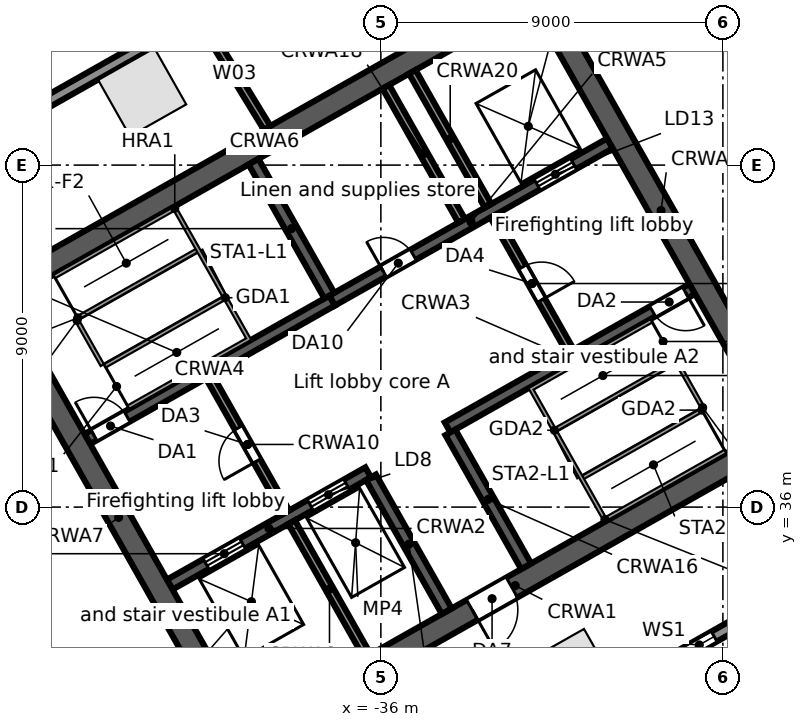
"""IFC4 building model, lengths in metres.
Left out: names, types, materials, properties, quantities, classifications, styles, units other than length and angle.
Written with IfcOpenShell. Run it as: python <this file> out.ifc"""

import sys

from ifc_helpers import new_model, si_unit, direction, frame, frame_2d, origin, origin_2d, place, context, subcontext, project, spatial, rectangle, extrude, element, fill, save


model = new_model("IFC4")
c1 = context("Model", 3, precision=1e-05, world=origin(), true_north=direction((0.0, 1.0)))
c2 = subcontext(c1, "Body", "Model", "MODEL_VIEW")
j1 = project(units=[si_unit("LENGTHUNIT", "METRE"), si_unit("PLANEANGLEUNIT", "RADIAN")], contexts=[c1])
p1 = place(None, origin())
s1 = spatial("IfcSite", under=j1, at=p1, CompositionType="ELEMENT")
p2 = place(p1, origin())
s2 = spatial("IfcBuilding", under=s1, at=p2, CompositionType="ELEMENT")
p3 = place(p2, frame((0.0, 0.0, 81.5)))
s3 = spatial("IfcBuildingStorey", under=s2, at=p3, CompositionType="ELEMENT", Elevation=81.5)
for number, where, z_axis, x_axis in (
    (1, (-42.28, 46.919, 0.0), (0.0, 0.0, 1.0), (-0.87, -0.492, 0.0)),
    (2, (-30.976, 31.635, 0.0), (0.0, 0.0, 1.0), (0.87, 0.492, 0.0)),
):
    element("IfcColumn", number, at=place(p3, frame(where, z_axis=z_axis, x_axis=x_axis)), inside=s3, PredefinedType="COLUMN", context=c2, shape_type="SweptSolid", body=[
        extrude(rectangle(XDim=1.7, YDim=1.7, at=origin_2d()), origin(), (0.0, 0.0, 1.0), 5.0),
    ])
p4 = place(p3, frame((-58.745, 38.764, 0.0), z_axis=(0.0, 0.0, 1.0), x_axis=(0.870355811726, 0.492423355453, 0.0)))
e3 = element("IfcWall", 3, at=p4, inside=s3, PredefinedType="STANDARD", context=c2, shape_type="SweptSolid", body=[
    extrude(rectangle(XDim=64.025, YDim=0.3, at=frame_2d((32.013, 0.0))), origin(), (0.0, 0.0, 1.0), 4.68),
])
p5 = place(p4, frame((60.122, 0.0, 0.6)))
e4 = element("IfcOpeningElement", 4, at=p5, cuts=e3, PredefinedType="OPENING", context=c2, shape_type="SweptSolid", body=[
    extrude(rectangle(XDim=0.9, YDim=3.2, at=frame_2d((0.45, 1.6))), frame((0.0, 0.16, 0.0), z_axis=(0.0, -1.0, 0.0), x_axis=(1.0, 0.0, 0.0)), (0.0, 0.0, 1.0), 0.32),
])
p6 = place(p4, frame((50.992, 0.0, 0.6)))
e5 = element("IfcOpeningElement", 5, at=p6, cuts=e3, PredefinedType="OPENING", context=c2, shape_type="SweptSolid", body=[
    extrude(rectangle(XDim=0.9, YDim=3.2, at=frame_2d((0.45, 1.6))), frame((0.0, 0.16, 0.0), z_axis=(0.0, -1.0, 0.0), x_axis=(1.0, 0.0, 0.0)), (0.0, 0.0, 1.0), 0.32),
])
p7 = place(p4, frame((41.862, 0.0, 0.6)))
e6 = element("IfcOpeningElement", 6, at=p7, cuts=e3, PredefinedType="OPENING", context=c2, shape_type="SweptSolid", body=[
    extrude(rectangle(XDim=0.9, YDim=3.2, at=frame_2d((0.45, 1.6))), frame((0.0, 0.16, 0.0), z_axis=(0.0, -1.0, 0.0), x_axis=(1.0, 0.0, 0.0)), (0.0, 0.0, 1.0), 0.32),
])
p8 = place(p4, frame((32.732, 0.0, 0.6)))
e7 = element("IfcOpeningElement", 7, at=p8, cuts=e3, PredefinedType="OPENING", context=c2, shape_type="SweptSolid", body=[
    extrude(rectangle(XDim=0.9, YDim=3.2, at=frame_2d((0.45, 1.6))), frame((0.0, 0.16, 0.0), z_axis=(0.0, -1.0, 0.0), x_axis=(1.0, 0.0, 0.0)), (0.0, 0.0, 1.0), 0.32),
])
p9 = place(p4, frame((23.602, 0.0, 0.6)))
e8 = element("IfcOpeningElement", 8, at=p9, cuts=e3, PredefinedType="OPENING", context=c2, shape_type="SweptSolid", body=[
    extrude(rectangle(XDim=0.9, YDim=3.2, at=frame_2d((0.45, 1.6))), frame((0.0, 0.16, 0.0), z_axis=(0.0, -1.0, 0.0), x_axis=(1.0, 0.0, 0.0)), (0.0, 0.0, 1.0), 0.32),
])
p10 = place(p4, frame((14.472, 0.0, 0.6)))
e9 = element("IfcOpeningElement", 9, at=p10, cuts=e3, PredefinedType="OPENING", context=c2, shape_type="SweptSolid", body=[
    extrude(rectangle(XDim=0.9, YDim=3.2, at=frame_2d((0.45, 1.6))), frame((0.0, 0.16, 0.0), z_axis=(0.0, -1.0, 0.0), x_axis=(1.0, 0.0, 0.0)), (0.0, 0.0, 1.0), 0.32),
])
p11 = place(p4, frame((5.342, 0.0, 0.6)))
e10 = element("IfcOpeningElement", 10, at=p11, cuts=e3, PredefinedType="OPENING", context=c2, shape_type="SweptSolid", body=[
    extrude(rectangle(XDim=0.9, YDim=3.2, at=frame_2d((0.45, 1.6))), frame((0.0, 0.16, 0.0), z_axis=(0.0, -1.0, 0.0), x_axis=(1.0, 0.0, 0.0)), (0.0, 0.0, 1.0), 0.32),
])
p12 = place(p3, frame((-44.109, 26.504, 0.0), z_axis=(0.0, 0.0, 1.0), x_axis=(-0.857169502585, 0.515034410344, 0.0)))
e11 = element("IfcWall", 11, at=p12, inside=s3, PredefinedType="STANDARD", context=c2, shape_type="SweptSolid", body=[
    extrude(rectangle(XDim=17.127, YDim=0.3, at=frame_2d((8.563, 0.0))), origin(), (0.0, 0.0, 1.0), 4.68),
])
p13 = place(p12, frame((13.403, 0.0, 0.6)))
e12 = element("IfcOpeningElement", 12, at=p13, cuts=e11, PredefinedType="OPENING", context=c2, shape_type="SweptSolid", body=[
    extrude(rectangle(XDim=0.9, YDim=3.2, at=frame_2d((0.45, 1.6))), frame((0.0, 0.16, 0.0), z_axis=(0.0, -1.0, 0.0), x_axis=(1.0, 0.0, 0.0)), (0.0, 0.0, 1.0), 0.32),
])
p14 = place(p12, frame((4.903, 0.0, 0.6)))
e13 = element("IfcOpeningElement", 13, at=p14, cuts=e11, PredefinedType="OPENING", context=c2, shape_type="SweptSolid", body=[
    extrude(rectangle(XDim=0.9, YDim=3.2, at=frame_2d((0.45, 1.6))), frame((0.0, 0.16, 0.0), z_axis=(0.0, -1.0, 0.0), x_axis=(1.0, 0.0, 0.0)), (0.0, 0.0, 1.0), 0.32),
])
p15 = place(p3, frame((-0.055, 47.969, 0.0), z_axis=(0.0, 0.0, 1.0), x_axis=(-0.870355730478, -0.492423499058, 0.0)))
e14 = element("IfcWall", 14, at=p15, inside=s3, PredefinedType="STANDARD", context=c2, shape_type="SweptSolid", body=[
    extrude(rectangle(XDim=43.75, YDim=0.3, at=frame_2d((21.875, 0.0))), origin(), (0.0, 0.0, 1.0), 4.68),
])
p16 = place(p15, frame((39.977, 0.0, 0.6)))
e15 = element("IfcOpeningElement", 15, at=p16, cuts=e14, PredefinedType="OPENING", context=c2, shape_type="SweptSolid", body=[
    extrude(rectangle(XDim=0.9, YDim=3.2, at=frame_2d((0.45, 1.6))), frame((0.0, 0.16, 0.0), z_axis=(0.0, -1.0, 0.0), x_axis=(1.0, 0.0, 0.0)), (0.0, 0.0, 1.0), 0.32),
])
p17 = place(p15, frame((31.222, 0.0, 0.6)))
e16 = element("IfcOpeningElement", 16, at=p17, cuts=e14, PredefinedType="OPENING", context=c2, shape_type="SweptSolid", body=[
    extrude(rectangle(XDim=0.9, YDim=3.2, at=frame_2d((0.45, 1.6))), frame((0.0, 0.16, 0.0), z_axis=(0.0, -1.0, 0.0), x_axis=(1.0, 0.0, 0.0)), (0.0, 0.0, 1.0), 0.32),
])
p18 = place(p15, frame((22.468, 0.0, 0.6)))
e17 = element("IfcOpeningElement", 17, at=p18, cuts=e14, PredefinedType="OPENING", context=c2, shape_type="SweptSolid", body=[
    extrude(rectangle(XDim=0.9, YDim=3.2, at=frame_2d((0.45, 1.6))), frame((0.0, 0.16, 0.0), z_axis=(0.0, -1.0, 0.0), x_axis=(1.0, 0.0, 0.0)), (0.0, 0.0, 1.0), 0.32),
])
p19 = place(p15, frame((13.713, 0.0, 0.6)))
e18 = element("IfcOpeningElement", 18, at=p19, cuts=e14, PredefinedType="OPENING", context=c2, shape_type="SweptSolid", body=[
    extrude(rectangle(XDim=0.9, YDim=3.2, at=frame_2d((0.45, 1.6))), frame((0.0, 0.16, 0.0), z_axis=(0.0, -1.0, 0.0), x_axis=(1.0, 0.0, 0.0)), (0.0, 0.0, 1.0), 0.32),
])
p20 = place(p15, frame((4.959, 0.0, 0.6)))
e19 = element("IfcOpeningElement", 19, at=p20, cuts=e14, PredefinedType="OPENING", context=c2, shape_type="SweptSolid", body=[
    extrude(rectangle(XDim=0.9, YDim=3.2, at=frame_2d((0.45, 1.6))), frame((0.0, 0.16, 0.0), z_axis=(0.0, -1.0, 0.0), x_axis=(1.0, 0.0, 0.0)), (0.0, 0.0, 1.0), 0.32),
])
p21 = place(p3, frame((-39.862, 29.749, 0.0), z_axis=(0.0, 0.0, 1.0), x_axis=(0.870350116061, 0.492433422375, 0.0)))
e20 = element("IfcWall", 20, at=p21, inside=s3, PredefinedType="SOLIDWALL", context=c2, shape_type="SweptSolid", body=[
    extrude(rectangle(XDim=17.0, YDim=0.6, at=frame_2d((8.5, 0.0))), origin(), (0.0, 0.0, 1.0), 4.68),
])
p22 = place(p21, frame((7.2, 0.0, 0.0)))
e21 = element("IfcOpeningElement", 21, at=p22, cuts=e20, PredefinedType="OPENING", context=c2, shape_type="SweptSolid", body=[
    extrude(rectangle(XDim=1.2, YDim=2.1, at=frame_2d((0.6, 1.05))), frame((0.0, 0.31, 0.0), z_axis=(0.0, -1.0, 0.0), x_axis=(1.0, 0.0, 0.0)), (0.0, 0.0, 1.0), 0.62),
])
p23 = place(p3, frame((-41.556, 33.961, 0.0), z_axis=(0.0, 0.0, 1.0), x_axis=(0.870343731308, 0.492444706919, 0.0)))
e22 = element("IfcWall", 22, at=p23, inside=s3, PredefinedType="SOLIDWALL", context=c2, shape_type="SweptSolid", body=[
    extrude(rectangle(XDim=6.0, YDim=0.3, at=frame_2d((3.0, 0.0))), origin(), (0.0, 0.0, 1.0), 4.68),
])
p24 = place(p23, frame((1.1, 0.0, 0.0)))
e23 = element("IfcOpeningElement", 23, at=p24, cuts=e22, PredefinedType="OPENING", context=c2, shape_type="SweptSolid", body=[
    extrude(rectangle(XDim=1.1, YDim=2.1, at=frame_2d((0.55, 1.05))), frame((0.0, 0.16, 0.0), z_axis=(0.0, -1.0, 0.0), x_axis=(1.0, 0.0, 0.0)), (0.0, 0.0, 1.0), 0.32),
])
p25 = place(p23, frame((4.25, 0.0, 0.0)))
e24 = element("IfcOpeningElement", 24, at=p25, cuts=e22, PredefinedType="OPENING", context=c2, shape_type="SweptSolid", body=[
    extrude(rectangle(XDim=1.1, YDim=2.1, at=frame_2d((0.55, 1.05))), frame((0.0, 0.16, 0.0), z_axis=(0.0, -1.0, 0.0), x_axis=(1.0, 0.0, 0.0)), (0.0, 0.0, 1.0), 0.32),
])
p26 = place(p3, frame((-34.245, 38.097, 0.0), z_axis=(0.0, 0.0, 1.0), x_axis=(0.870364910201, 0.492407273597, 0.0)))
e25 = element("IfcWall", 25, at=p26, inside=s3, PredefinedType="SOLIDWALL", context=c2, shape_type="SweptSolid", body=[
    extrude(rectangle(XDim=7.4, YDim=0.3, at=frame_2d((3.7, 0.0))), origin(), (0.0, 0.0, 1.0), 4.68),
])
p27 = place(p26, frame((6.2, 0.0, 0.0)))
e26 = element("IfcOpeningElement", 26, at=p27, cuts=e25, PredefinedType="OPENING", context=c2, shape_type="SweptSolid", body=[
    extrude(rectangle(XDim=1.0, YDim=2.1, at=frame_2d((0.5, 1.05))), frame((0.0, 0.16, 0.0), z_axis=(0.0, -1.0, 0.0), x_axis=(1.0, 0.0, 0.0)), (0.0, 0.0, 1.0), 0.32),
])
p28 = place(p3, frame((-43.723, 37.791, 0.0), z_axis=(0.0, 0.0, 1.0), x_axis=(0.87035077051, 0.49243226567, 0.0)))
e27 = element("IfcWall", 27, at=p28, inside=s3, PredefinedType="SOLIDWALL", context=c2, shape_type="SweptSolid", body=[
    extrude(rectangle(XDim=7.4, YDim=0.3, at=frame_2d((3.7, 0.0))), origin(), (0.0, 0.0, 1.0), 4.68),
])
p29 = place(p28, frame((0.2, 0.0, 0.0)))
e28 = element("IfcOpeningElement", 28, at=p29, cuts=e27, PredefinedType="OPENING", context=c2, shape_type="SweptSolid", body=[
    extrude(rectangle(XDim=1.0, YDim=2.1, at=frame_2d((0.5, 1.05))), frame((0.0, 0.16, 0.0), z_axis=(0.0, -1.0, 0.0), x_axis=(1.0, 0.0, 0.0)), (0.0, 0.0, 1.0), 0.32),
])
p30 = place(p3, frame((-37.282, 41.435, 0.0), z_axis=(0.0, 0.0, 1.0), x_axis=(0.870356516133, 0.492422110414, 0.0)))
e29 = element("IfcWall", 29, at=p30, inside=s3, PredefinedType="SOLIDWALL", context=c2, shape_type="SweptSolid", body=[
    extrude(rectangle(XDim=8.4, YDim=0.3, at=frame_2d((4.2, 0.0))), origin(), (0.0, 0.0, 1.0), 4.68),
])
p31 = place(p30, frame((6.2, 0.0, 0.0)))
e30 = element("IfcOpeningElement", 30, at=p31, cuts=e29, PredefinedType="OPENING", context=c2, shape_type="SweptSolid", body=[
    extrude(rectangle(XDim=1.1, YDim=2.1, at=frame_2d((0.55, 1.05))), frame((0.0, 0.16, 0.0), z_axis=(0.0, -1.0, 0.0), x_axis=(1.0, 0.0, 0.0)), (0.0, 0.0, 1.0), 0.32),
])
p32 = place(p30, frame((1.55, 0.0, 0.0)))
e31 = element("IfcOpeningElement", 31, at=p32, cuts=e29, PredefinedType="OPENING", context=c2, shape_type="SweptSolid", body=[
    extrude(rectangle(XDim=0.9, YDim=2.1, at=frame_2d((0.45, 1.05))), frame((0.0, 0.16, 0.0), z_axis=(0.0, -1.0, 0.0), x_axis=(1.0, 0.0, 0.0)), (0.0, 0.0, 1.0), 0.32),
])
p33 = place(p3, frame((-46.461, 41.412, 0.0), z_axis=(0.0, 0.0, 1.0), x_axis=(0.870350116061, 0.492433422375, 0.0)))
e32 = element("IfcWall", 32, at=p33, inside=s3, PredefinedType="SOLIDWALL", context=c2, shape_type="SweptSolid", body=[
    extrude(rectangle(XDim=17.0, YDim=0.6, at=frame_2d((8.5, 0.0))), origin(), (0.0, 0.0, 1.0), 4.68),
])
p34 = place(p3, frame((-46.052, 41.298, 0.0), z_axis=(0.0, 0.0, 1.0), x_axis=(0.492418598281, -0.870358503186, 0.0)))
e33 = element("IfcWall", 33, at=p34, inside=s3, PredefinedType="SOLIDWALL", context=c2, shape_type="SweptSolid", body=[
    extrude(rectangle(XDim=12.8, YDim=0.6, at=frame_2d((6.4, 0.0))), origin(), (0.0, 0.0, 1.0), 4.68),
])
p35 = place(p3, frame((-38.349, 35.603, 0.0), z_axis=(0.0, 0.0, 1.0), x_axis=(0.49241474071, -0.870360685654, 0.0)))
e34 = element("IfcWall", 34, at=p35, inside=s3, PredefinedType="SOLIDWALL", context=c2, shape_type="SweptSolid", body=[
    extrude(rectangle(XDim=4.05, YDim=0.2, at=frame_2d((2.025, 0.0))), origin(), (0.0, 0.0, 1.0), 4.68),
])
p36 = place(p3, frame((-40.516, 39.433, 0.0), z_axis=(0.0, 0.0, 1.0), x_axis=(0.492453559952, -0.87033872216, 0.0)))
e35 = element("IfcWall", 35, at=p36, inside=s3, PredefinedType="PARTITIONING", context=c2, shape_type="SweptSolid", body=[
    extrude(rectangle(XDim=4.1, YDim=0.2, at=frame_2d((2.05, 0.0))), origin(), (0.0, 0.0, 1.0), 4.68),
])
p37 = place(p36, frame((1.55, 0.0, 0.0)))
e36 = element("IfcOpeningElement", 36, at=p37, cuts=e35, PredefinedType="OPENING", context=c2, shape_type="SweptSolid", body=[
    extrude(rectangle(XDim=1.0, YDim=2.1, at=frame_2d((0.5, 1.05))), frame((0.0, 0.11, 0.0), z_axis=(0.0, -1.0, 0.0), x_axis=(1.0, 0.0, 0.0)), (0.0, 0.0, 1.0), 0.22),
])
p38 = place(p3, frame((-36.26, 36.785, 0.0), z_axis=(0.0, 0.0, 1.0), x_axis=(0.492440575896, -0.870346068648, 0.0)))
e37 = element("IfcWall", 37, at=p38, inside=s3, PredefinedType="SOLIDWALL", context=c2, shape_type="SweptSolid", body=[
    extrude(rectangle(XDim=4.05, YDim=0.3, at=frame_2d((2.025, 0.0))), origin(), (0.0, 0.0, 1.0), 4.68),
])
p39 = place(p3, frame((-39.35, 45.09, 0.0), z_axis=(0.0, 0.0, 1.0), x_axis=(0.49241474071, -0.870360685654, 0.0)))
e38 = element("IfcWall", 38, at=p39, inside=s3, PredefinedType="SOLIDWALL", context=c2, shape_type="SweptSolid", body=[
    extrude(rectangle(XDim=4.05, YDim=0.3, at=frame_2d((2.025, 0.0))), origin(), (0.0, 0.0, 1.0), 4.68),
])
p40 = place(p3, frame((-34.171, 37.967, 0.0), z_axis=(0.0, 0.0, 1.0), x_axis=(0.492394910396, -0.870371904542, 0.0)))
e39 = element("IfcWall", 39, at=p40, inside=s3, PredefinedType="SOLIDWALL", context=c2, shape_type="SweptSolid", body=[
    extrude(rectangle(XDim=4.05, YDim=0.3, at=frame_2d((2.025, 0.0))), origin(), (0.0, 0.0, 1.0), 4.68),
])
p41 = place(p3, frame((-35.869, 47.06, 0.0), z_axis=(0.0, 0.0, 1.0), x_axis=(0.49241474071, -0.870360685654, 0.0)))
e40 = element("IfcWall", 40, at=p41, inside=s3, PredefinedType="SOLIDWALL", context=c2, shape_type="SweptSolid", body=[
    extrude(rectangle(XDim=4.05, YDim=0.2, at=frame_2d((2.025, 0.0))), origin(), (0.0, 0.0, 1.0), 4.68),
])
p42 = place(p3, frame((-33.031, 43.667, 0.0), z_axis=(0.0, 0.0, 1.0), x_axis=(0.492408451753, -0.87036424366, 0.0)))
e41 = element("IfcWall", 41, at=p42, inside=s3, PredefinedType="PARTITIONING", context=c2, shape_type="SweptSolid", body=[
    extrude(rectangle(XDim=4.1, YDim=0.2, at=frame_2d((2.05, 0.0))), origin(), (0.0, 0.0, 1.0), 4.68),
])
p43 = place(p42, frame((1.55, 0.0, 0.0)))
e42 = element("IfcOpeningElement", 42, at=p43, cuts=e41, PredefinedType="OPENING", context=c2, shape_type="SweptSolid", body=[
    extrude(rectangle(XDim=1.0, YDim=2.1, at=frame_2d((0.5, 1.05))), frame((0.0, 0.11, 0.0), z_axis=(0.0, -1.0, 0.0), x_axis=(1.0, 0.0, 0.0)), (0.0, 0.0, 1.0), 0.22),
])
p44 = place(p3, frame((-35.173, 47.454, 0.0), z_axis=(0.0, 0.0, 1.0), x_axis=(0.492440575896, -0.870346068648, 0.0)))
e43 = element("IfcWall", 43, at=p44, inside=s3, PredefinedType="SOLIDWALL", context=c2, shape_type="SweptSolid", body=[
    extrude(rectangle(XDim=4.05, YDim=0.2, at=frame_2d((2.025, 0.0))), origin(), (0.0, 0.0, 1.0), 4.68),
])
p45 = place(p3, frame((-31.778, 49.374, 0.0), z_axis=(0.0, 0.0, 1.0), x_axis=(0.492433046652, -0.870350328641, 0.0)))
e44 = element("IfcWall", 44, at=p45, inside=s3, PredefinedType="SOLIDWALL", context=c2, shape_type="SweptSolid", body=[
    extrude(rectangle(XDim=12.8, YDim=0.6, at=frame_2d((6.4, 0.0))), origin(), (0.0, 0.0, 1.0), 4.68),
])
p46 = place(p3, frame((-40.713, 48.794, 0.0), z_axis=(0.0, 0.0, 1.0), x_axis=(0.52165366254, -0.853157345604, 0.0)))
e45 = element("IfcWall", 45, at=p46, inside=s3, PredefinedType="PARTITIONING", context=c2, shape_type="SweptSolid", body=[
    extrude(rectangle(XDim=3.297, YDim=0.2, at=frame_2d((1.648, 0.0))), origin(), (0.0, 0.0, 1.0), 3.96),
])
p47 = place(p17, origin())
e46 = element("IfcWindow", 46, at=p47, inside=s3, PartitioningType="SINGLE_PANEL", PredefinedType="WINDOW", context=c2, shape_type="SweptSolid", body=[
    extrude(rectangle(XDim=0.9, YDim=3.2, at=frame_2d((0.45, 1.6))), frame((0.0, 0.03, 0.0), z_axis=(0.0, -1.0, 0.0), x_axis=(1.0, 0.0, 0.0)), (0.0, 0.0, 1.0), 0.06),
])
fill(e16, e46)
p48 = place(p31, origin())
e47 = element("IfcDoor", 47, at=p48, inside=s3, OperationType="DOUBLE_DOOR_SLIDING", PredefinedType="DOOR", context=c2, shape_type="SweptSolid", body=[
    extrude(rectangle(XDim=1.1, YDim=2.1, at=frame_2d((0.55, 1.05))), frame((0.0, 0.025, 0.0), z_axis=(0.0, -1.0, 0.0), x_axis=(1.0, 0.0, 0.0)), (0.0, 0.0, 1.0), 0.05),
])
fill(e30, e47)
p49 = place(p24, origin())
e48 = element("IfcDoor", 48, at=p49, inside=s3, OperationType="DOUBLE_DOOR_SLIDING", PredefinedType="DOOR", context=c2, shape_type="SweptSolid", body=[
    extrude(rectangle(XDim=1.1, YDim=2.1, at=frame_2d((0.55, 1.05))), frame((0.0, 0.025, 0.0), z_axis=(0.0, -1.0, 0.0), x_axis=(1.0, 0.0, 0.0)), (0.0, 0.0, 1.0), 0.05),
])
fill(e23, e48)
p50 = place(p25, origin())
e49 = element("IfcDoor", 49, at=p50, inside=s3, OperationType="DOUBLE_DOOR_SLIDING", PredefinedType="DOOR", context=c2, shape_type="SweptSolid", body=[
    extrude(rectangle(XDim=1.1, YDim=2.1, at=frame_2d((0.55, 1.05))), frame((0.0, 0.025, 0.0), z_axis=(0.0, -1.0, 0.0), x_axis=(1.0, 0.0, 0.0)), (0.0, 0.0, 1.0), 0.05),
])
fill(e24, e49)
p51 = place(p29, origin())
e50 = element("IfcDoor", 50, at=p51, inside=s3, OperationType="SINGLE_SWING_LEFT", PredefinedType="DOOR", context=c2, shape_type="SweptSolid", body=[
    extrude(rectangle(XDim=1.0, YDim=2.1, at=frame_2d((0.5, 1.05))), frame((0.0, 0.025, 0.0), z_axis=(0.0, -1.0, 0.0), x_axis=(1.0, 0.0, 0.0)), (0.0, 0.0, 1.0), 0.05),
])
fill(e28, e50)
p52 = place(p27, frame((1.0, 0.0, 0.0), z_axis=(0.0, 0.0, 1.0), x_axis=(-1.0, 0.0, 0.0)))
e51 = element("IfcDoor", 51, at=p52, inside=s3, OperationType="SINGLE_SWING_LEFT", PredefinedType="DOOR", context=c2, shape_type="SweptSolid", body=[
    extrude(rectangle(XDim=1.0, YDim=2.1, at=frame_2d((0.5, 1.05))), frame((0.0, 0.025, 0.0), z_axis=(0.0, -1.0, 0.0), x_axis=(1.0, 0.0, 0.0)), (0.0, 0.0, 1.0), 0.05),
])
fill(e26, e51)
p53 = place(p37, frame((1.0, 0.0, 0.0), z_axis=(0.0, 0.0, 1.0), x_axis=(-1.0, 0.0, 0.0)))
e52 = element("IfcDoor", 52, at=p53, inside=s3, OperationType="SINGLE_SWING_LEFT", PredefinedType="DOOR", context=c2, shape_type="SweptSolid", body=[
    extrude(rectangle(XDim=1.0, YDim=2.1, at=frame_2d((0.5, 1.05))), frame((0.0, 0.025, 0.0), z_axis=(0.0, -1.0, 0.0), x_axis=(1.0, 0.0, 0.0)), (0.0, 0.0, 1.0), 0.05),
])
fill(e36, e52)
p54 = place(p43, origin())
e53 = element("IfcDoor", 53, at=p54, inside=s3, OperationType="SINGLE_SWING_RIGHT", PredefinedType="DOOR", context=c2, shape_type="SweptSolid", body=[
    extrude(rectangle(XDim=1.0, YDim=2.1, at=frame_2d((0.5, 1.05))), frame((0.0, 0.025, 0.0), z_axis=(0.0, -1.0, 0.0), x_axis=(1.0, 0.0, 0.0)), (0.0, 0.0, 1.0), 0.05),
])
fill(e42, e53)
p55 = place(p22, frame((1.2, 0.0, 0.0), z_axis=(0.0, 0.0, 1.0), x_axis=(-1.0, 0.0, 0.0)))
e54 = element("IfcDoor", 54, at=p55, inside=s3, OperationType="SINGLE_SWING_RIGHT", PredefinedType="DOOR", context=c2, shape_type="SweptSolid", body=[
    extrude(rectangle(XDim=1.2, YDim=2.1, at=frame_2d((0.6, 1.05))), frame((0.0, 0.025, 0.0), z_axis=(0.0, -1.0, 0.0), x_axis=(1.0, 0.0, 0.0)), (0.0, 0.0, 1.0), 0.05),
])
fill(e21, e54)
p56 = place(p32, origin())
e55 = element("IfcDoor", 55, at=p56, inside=s3, OperationType="SINGLE_SWING_LEFT", PredefinedType="DOOR", context=c2, shape_type="SweptSolid", body=[
    extrude(rectangle(XDim=0.9, YDim=2.1, at=frame_2d((0.45, 1.05))), frame((0.0, 0.025, 0.0), z_axis=(0.0, -1.0, 0.0), x_axis=(1.0, 0.0, 0.0)), (0.0, 0.0, 1.0), 0.05),
])
fill(e31, e55)
save(model, sys.argv[1])
